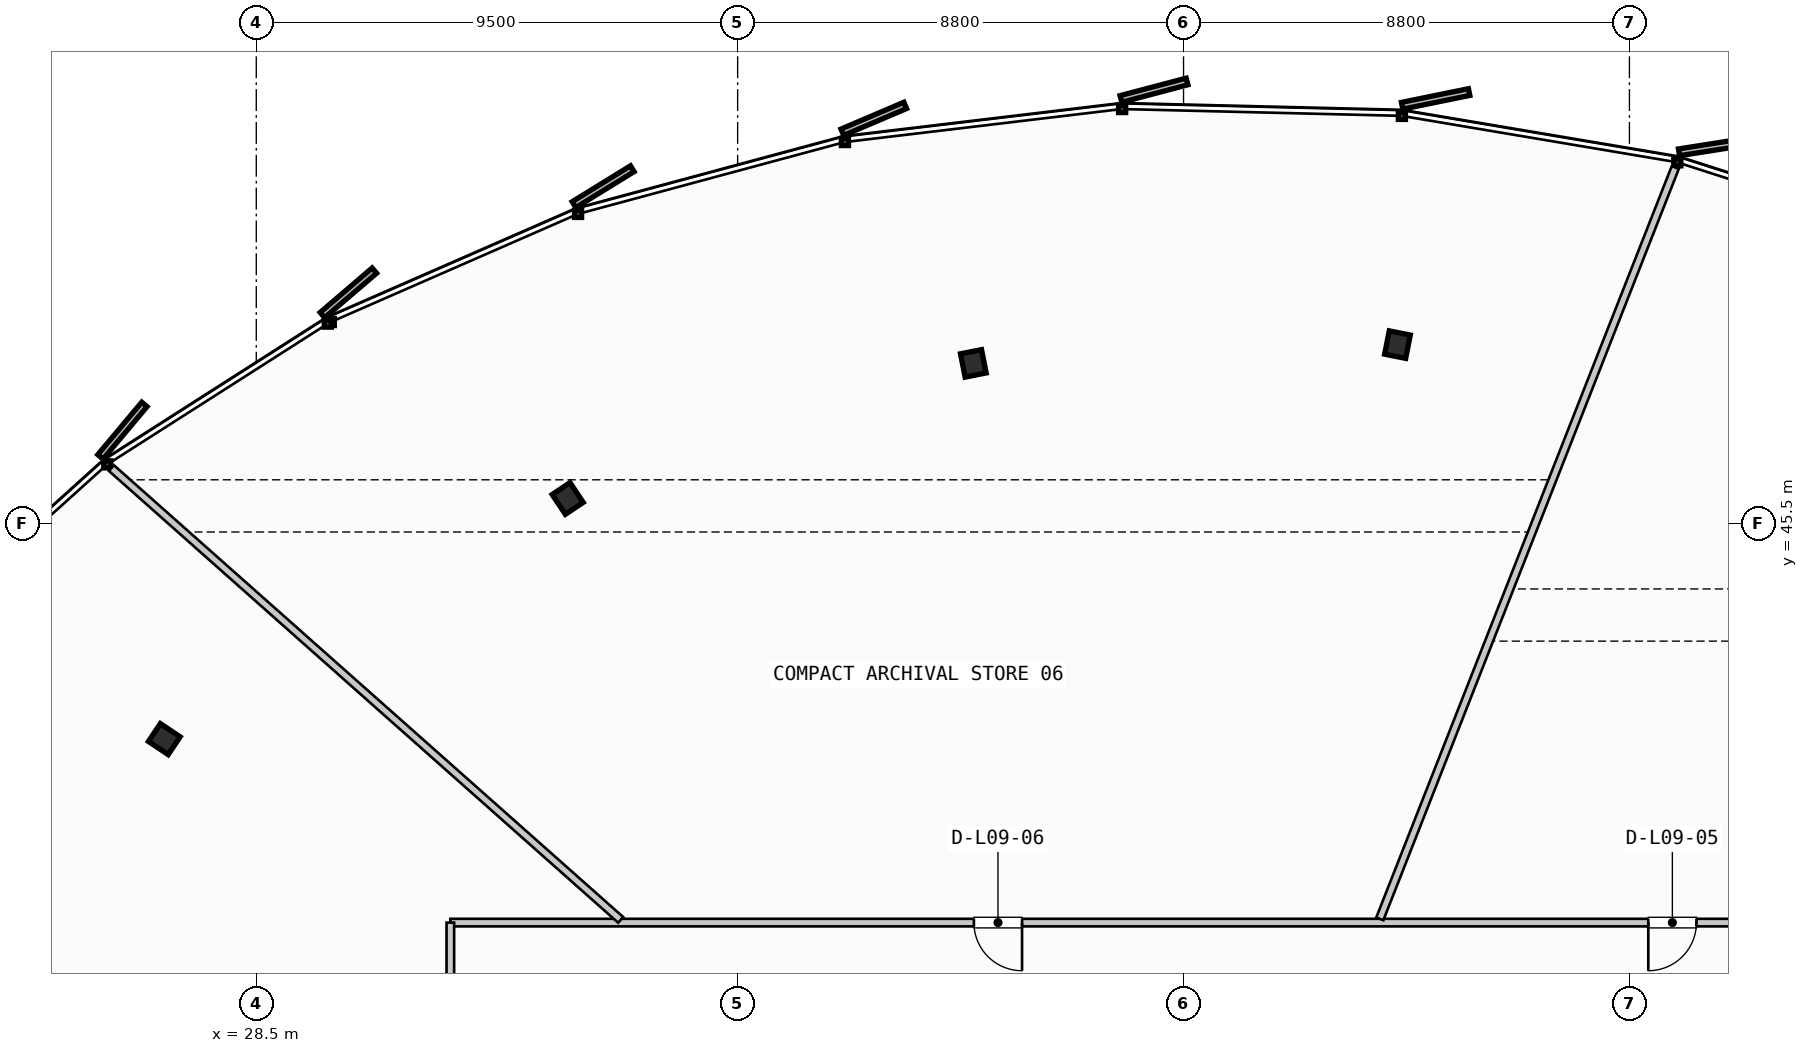
"""IFC4 building model, lengths in metres.
Left out: names, types, materials, properties, quantities, classifications, styles, units other than length and angle.
Written with IfcOpenShell. Run it as: python <this file> out.ifc"""

import sys

from ifc_helpers import new_model, si_unit, direction, frame, frame_2d, origin, origin_2d, place, context, subcontext, project, spatial, rectangle, i_section, extrude, source, transform, mapped, element, fill, save


model = new_model("IFC4")
c1 = context("Model", 3, precision=1e-05, world=origin(), true_north=direction((0.0, 1.0)))
c2 = subcontext(c1, "Body", "Model", "MODEL_VIEW")
j1 = project(units=[si_unit("LENGTHUNIT", "METRE"), si_unit("PLANEANGLEUNIT", "RADIAN")], contexts=[c1])
p1 = place(None, origin())
s1 = spatial("IfcSite", under=j1, at=p1, CompositionType="ELEMENT")
p2 = place(p1, origin())
s2 = spatial("IfcBuilding", under=s1, at=p2, CompositionType="ELEMENT")
p3 = place(p2, frame((0.0, 0.0, 41.0)))
s3 = spatial("IfcBuildingStorey", under=s2, at=p3, CompositionType="ELEMENT", Elevation=41.0)
m1 = source(origin(), c2, "Body", "SweptSolid", [
    extrude(i_section(OverallWidth=0.423, OverallDepth=0.469, WebThickness=0.051, FlangeThickness=0.081, FilletRadius=0.015, at=origin_2d()), origin(), (0.0, 0.0, 1.0), 3.55),
])
for number, where, z_axis, x_axis in (
    (1, (51.022, 49.026, 0.0), (0.0, 0.0, 1.0), (0.195, 0.981, 0.0)),
    (2, (42.652, 48.656, 0.0), (0.0, 0.0, 1.0), (-0.195, 0.981, 0.0)),
    (3, (34.646, 45.99, 0.0), (0.0, 0.0, 1.0), (-0.556, 0.831, 0.0)),
    (4, (26.685, 41.241, 0.0), (0.0, 0.0, 1.0), (-0.831, 0.556, 0.0)),
):
    element("IfcColumn", number, at=place(p3, frame(where, z_axis=z_axis, x_axis=x_axis)), inside=s3, PredefinedType="COLUMN", context=c2, shape_type="MappedRepresentation", body=[
        mapped(m1, transform((0.0, 0.0, 0.0), scale=1.0)),
    ])
p4 = place(p3, frame((62.83, 37.62, 0.0), z_axis=(0.0, 0.0, 1.0), x_axis=(-1.0, 0.0, 0.0)))
e5 = element("IfcWall", 5, at=p4, inside=s3, PredefinedType="PARTITIONING", context=c2, shape_type="SweptSolid", body=[
    extrude(rectangle(XDim=30.5, YDim=0.15, at=frame_2d((15.25, 0.0))), origin(), (0.0, 0.0, 1.0), 2.785),
])
p5 = place(p4, frame((5.908, 0.0, 0.0)))
e6 = element("IfcOpeningElement", 6, at=p5, cuts=e5, PredefinedType="OPENING", context=c2, shape_type="SweptSolid", body=[
    extrude(rectangle(XDim=0.95, YDim=2.15, at=frame_2d((0.475, 1.075))), frame((0.0, 0.085, 0.0), z_axis=(0.0, -1.0, 0.0), x_axis=(1.0, 0.0, 0.0)), (0.0, 0.0, 1.0), 0.17),
])
p6 = place(p4, frame((19.217, 0.0, 0.0)))
e7 = element("IfcOpeningElement", 7, at=p6, cuts=e5, PredefinedType="OPENING", context=c2, shape_type="SweptSolid", body=[
    extrude(rectangle(XDim=0.95, YDim=2.15, at=frame_2d((0.475, 1.075))), frame((0.0, 0.085, 0.0), z_axis=(0.0, -1.0, 0.0), x_axis=(1.0, 0.0, 0.0)), (0.0, 0.0, 1.0), 0.17),
])
p7 = place(p3, frame((32.33, 37.62, 0.0), z_axis=(0.0, 0.0, 1.0), x_axis=(0.0, -1.0, 0.0)))
e8 = element("IfcWall", 8, at=p7, inside=s3, PredefinedType="PARTITIONING", context=c2, shape_type="SweptSolid", body=[
    extrude(rectangle(XDim=20.48, YDim=0.15, at=frame_2d((10.24, 0.0))), origin(), (0.0, 0.0, 1.0), 2.785),
])
p8 = place(p7, frame((9.765, 0.0, 0.0)))
e9 = element("IfcOpeningElement", 9, at=p8, cuts=e8, PredefinedType="OPENING", context=c2, shape_type="SweptSolid", body=[
    extrude(rectangle(XDim=0.95, YDim=2.15, at=frame_2d((0.475, 1.075))), frame((0.0, 0.085, 0.0), z_axis=(0.0, -1.0, 0.0), x_axis=(1.0, 0.0, 0.0)), (0.0, 0.0, 1.0), 0.17),
])
p9 = place(p3, frame((50.674, 37.694, 0.0), z_axis=(0.0, 0.0, 1.0), x_axis=(0.365989434305, 0.930619005811, 0.0)))
e10 = element("IfcWall", 10, at=p9, inside=s3, PredefinedType="PARTITIONING", context=c2, shape_type="SweptSolid", body=[
    extrude(rectangle(XDim=15.932, YDim=0.15, at=frame_2d((7.966, 0.0))), origin(), (0.0, 0.0, 1.0), 2.785),
])
p10 = place(p3, frame((35.692, 37.673, 0.0), z_axis=(0.0, 0.0, 1.0), x_axis=(-0.748055578895, 0.663636083169, 0.0)))
e11 = element("IfcWall", 11, at=p10, inside=s3, PredefinedType="PARTITIONING", context=c2, shape_type="SweptSolid", body=[
    extrude(rectangle(XDim=13.436, YDim=0.15, at=frame_2d((6.718, 0.0))), origin(), (0.0, 0.0, 1.0), 2.785),
])
m2 = source(origin(), c2, "Body", "SweptSolid", [
    extrude(rectangle(XDim=0.95, YDim=2.15, at=frame_2d((0.475, 1.075))), frame((0.0, 0.025, 0.0), z_axis=(0.0, -1.0, 0.0), x_axis=(1.0, 0.0, 0.0)), (0.0, 0.0, 1.0), 0.05),
])
p11 = place(p5, origin())
e12 = element("IfcDoor", 12, at=p11, inside=s3, OperationType="SINGLE_SWING_RIGHT", PredefinedType="DOOR", context=c2, shape_type="MappedRepresentation", body=[
    mapped(m2, transform((0.0, 0.0, 0.0), scale=1.0)),
])
fill(e6, e12)
p12 = place(p6, origin())
e13 = element("IfcDoor", 13, at=p12, inside=s3, OperationType="SINGLE_SWING_LEFT", PredefinedType="DOOR", context=c2, shape_type="MappedRepresentation", body=[
    mapped(m2, transform((0.0, 0.0, 0.0), scale=1.0)),
])
fill(e7, e13)
save(model, sys.argv[1])
